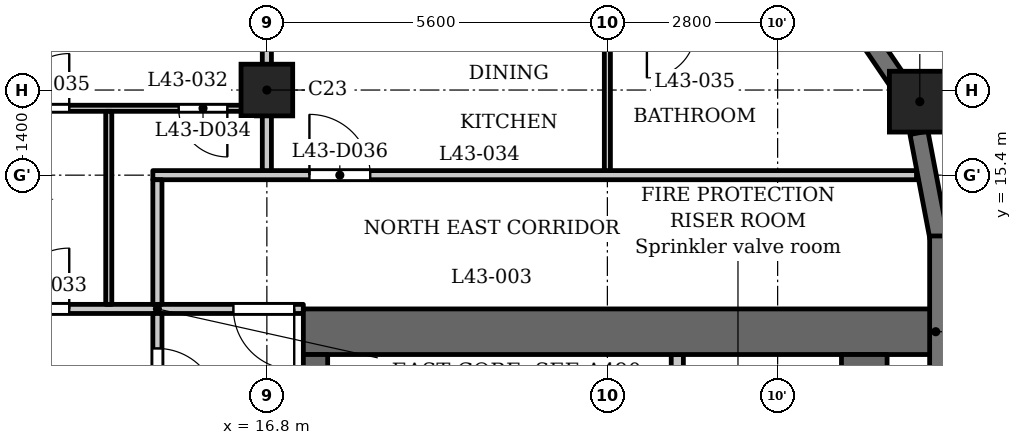
"""IFC4 building model, lengths in metres.
Left out: names, types, materials, properties, quantities, classifications, styles, units other than length and angle.
Written with IfcOpenShell. Run it as: python <this file> out.ifc"""

import sys

from ifc_helpers import new_model, si_unit, direction, frame, frame_2d, origin, origin_2d, place, context, subcontext, project, spatial, rectangle, extrude, element, fill, save


model = new_model("IFC4")
c1 = context("Model", 3, precision=1e-05, world=origin(), true_north=direction((0.0, 1.0)))
c2 = subcontext(c1, "Body", "Model", "MODEL_VIEW")
j1 = project(units=[si_unit("LENGTHUNIT", "METRE"), si_unit("PLANEANGLEUNIT", "RADIAN")], contexts=[c1])
p1 = place(None, origin())
s1 = spatial("IfcSite", under=j1, at=p1, CompositionType="ELEMENT")
p2 = place(p1, origin())
s2 = spatial("IfcBuilding", under=s1, at=p2, CompositionType="ELEMENT")
p3 = place(p2, frame((0.0, 0.0, 167.6)))
s3 = spatial("IfcBuildingStorey", under=s2, at=p3, CompositionType="ELEMENT", Elevation=167.6)
p4 = place(p3, frame((27.538, 16.609, 0.0), z_axis=(0.0, 0.0, 1.0), x_axis=(1.0, 0.0, 0.0)))
e1 = element("IfcColumn", 1, at=p4, inside=s3, PredefinedType="COLUMN", context=c2, shape_type="SweptSolid", body=[
    extrude(rectangle(XDim=1.0, YDim=1.0, at=origin_2d()), origin(), (0.0, 0.0, 1.0), 3.5),
])
p5 = place(p3, frame((16.8, 16.8, 0.0), z_axis=(0.0, 0.0, 1.0), x_axis=(1.0, 0.0, 0.0)))
e2 = element("IfcColumn", 2, at=p5, inside=s3, PredefinedType="COLUMN", context=c2, shape_type="SweptSolid", body=[
    extrude(rectangle(XDim=0.85, YDim=0.85, at=origin_2d()), origin(), (0.0, 0.0, 1.0), 3.5),
])
p6 = place(p3, frame((27.85, 11.7, 0.0), z_axis=(0.0, 0.0, 1.0), x_axis=(0.0, 1.0, 0.0)))
e3 = element("IfcWall", 3, at=p6, inside=s3, PredefinedType="SOLIDWALL", context=c2, shape_type="SweptSolid", body=[
    extrude(rectangle(XDim=2.7, YDim=0.3, at=frame_2d((1.35, 0.0))), origin(), (0.0, 0.0, 1.0), 2.45),
])
for number, where, z_axis, x_axis in (
    (4, (27.853, 14.372, 0.0), (0.0, 0.0, 1.0), (-0.187, 0.982, 0.0)),
    (5, (27.166, 16.96, 0.0), (0.0, 0.0, 1.0), (-0.562, 0.827, 0.0)),
):
    element("IfcWall", number, at=place(p3, frame(where, z_axis=z_axis, x_axis=x_axis)), inside=s3, PredefinedType="SOLIDWALL", context=c2, shape_type="SweptSolid", body=[
        extrude(rectangle(XDim=1.756, YDim=0.3, at=frame_2d((0.878, 0.0))), origin(), (0.0, 0.0, 1.0), 2.45),
    ])
p7 = place(p3, frame((17.4, 12.825, 0.0), z_axis=(0.0, 0.0, 1.0), x_axis=(1.0, 0.0, 0.0)))
e6 = element("IfcWall", 6, at=p7, inside=s3, PredefinedType="SHEAR", context=c2, shape_type="SweptSolid", body=[
    extrude(rectangle(XDim=10.4, YDim=0.75, at=frame_2d((5.2, 0.0))), origin(), (0.0, 0.0, 1.0), 3.2),
])
p8 = place(p3, frame((17.6, -12.45, 0.0), z_axis=(0.0, 0.0, 1.0), x_axis=(0.0, 1.0, 0.0)))
e7 = element("IfcWall", 7, at=p8, inside=s3, PredefinedType="SHEAR", context=c2, shape_type="SweptSolid", body=[
    extrude(rectangle(XDim=24.9, YDim=0.4, at=frame_2d((12.45, 0.0))), origin(), (0.0, 0.0, 1.0), 3.2),
])
p9 = place(p8, frame((8.65, 0.0, 0.0)))
e8 = element("IfcOpeningElement", 8, at=p9, cuts=e7, PredefinedType="OPENING", context=c2, shape_type="SweptSolid", body=[
    extrude(rectangle(XDim=0.9, YDim=2.1, at=frame_2d((0.45, 1.05))), frame((0.0, 0.21, 0.0), z_axis=(0.0, -1.0, 0.0), x_axis=(1.0, 0.0, 0.0)), (0.0, 0.0, 1.0), 0.42),
])
p10 = place(p8, frame((15.6, 0.0, 0.0)))
e9 = element("IfcOpeningElement", 9, at=p10, cuts=e7, PredefinedType="OPENING", context=c2, shape_type="SweptSolid", body=[
    extrude(rectangle(XDim=1.1, YDim=2.1, at=frame_2d((0.55, 1.05))), frame((0.0, 0.21, 0.0), z_axis=(0.0, -1.0, 0.0), x_axis=(1.0, 0.0, 0.0)), (0.0, 0.0, 1.0), 0.42),
])
p11 = place(p8, frame((18.0, 0.0, 0.0)))
e10 = element("IfcOpeningElement", 10, at=p11, cuts=e7, PredefinedType="OPENING", context=c2, shape_type="SweptSolid", body=[
    extrude(rectangle(XDim=1.1, YDim=2.1, at=frame_2d((0.55, 1.05))), frame((0.0, 0.21, 0.0), z_axis=(0.0, -1.0, 0.0), x_axis=(1.0, 0.0, 0.0)), (0.0, 0.0, 1.0), 0.42),
])
p12 = place(p8, frame((23.025, 0.0, 0.0)))
e11 = element("IfcOpeningElement", 11, at=p12, cuts=e7, PredefinedType="OPENING", context=c2, shape_type="SweptSolid", body=[
    extrude(rectangle(XDim=1.1, YDim=2.1, at=frame_2d((0.55, 1.05))), frame((0.0, 0.21, 0.0), z_axis=(0.0, -1.0, 0.0), x_axis=(1.0, 0.0, 0.0)), (0.0, 0.0, 1.0), 0.42),
])
p13 = place(p8, frame((0.775, 0.0, 0.0)))
e12 = element("IfcOpeningElement", 12, at=p13, cuts=e7, PredefinedType="OPENING", context=c2, shape_type="SweptSolid", body=[
    extrude(rectangle(XDim=1.1, YDim=2.1, at=frame_2d((0.55, 1.05))), frame((0.0, 0.21, 0.0), z_axis=(0.0, -1.0, 0.0), x_axis=(1.0, 0.0, 0.0)), (0.0, 0.0, 1.0), 0.42),
])
p14 = place(p8, frame((12.925, 0.0, 0.0)))
e13 = element("IfcOpeningElement", 13, at=p14, cuts=e7, PredefinedType="OPENING", context=c2, shape_type="SweptSolid", body=[
    extrude(rectangle(XDim=1.8, YDim=2.1, at=frame_2d((0.9, 1.05))), frame((0.0, 0.21, 0.0), z_axis=(0.0, -1.0, 0.0), x_axis=(1.0, 0.0, 0.0)), (0.0, 0.0, 1.0), 0.42),
])
p15 = place(p3, frame((26.625, -12.45, 0.0), z_axis=(0.0, 0.0, 1.0), x_axis=(0.0, 1.0, 0.0)))
e14 = element("IfcWall", 14, at=p15, inside=s3, PredefinedType="SHEAR", context=c2, shape_type="SweptSolid", body=[
    extrude(rectangle(XDim=24.9, YDim=0.75, at=frame_2d((12.45, 0.0))), origin(), (0.0, 0.0, 1.0), 3.2),
])
p16 = place(p3, frame((23.55, 9.8, 0.0), z_axis=(0.0, 0.0, 1.0), x_axis=(0.0, 1.0, 0.0)))
e15 = element("IfcWall", 15, at=p16, inside=s3, PredefinedType="PARTITIONING", context=c2, shape_type="SweptSolid", body=[
    extrude(rectangle(XDim=2.65, YDim=0.2, at=frame_2d((1.325, 0.0))), origin(), (0.0, 0.0, 1.0), 3.2),
])
p17 = place(p16, frame((0.875, 0.0, 0.0)))
e16 = element("IfcOpeningElement", 16, at=p17, cuts=e15, PredefinedType="OPENING", context=c2, shape_type="SweptSolid", body=[
    extrude(rectangle(XDim=0.9, YDim=2.1, at=frame_2d((0.45, 1.05))), frame((0.0, 0.11, 0.0), z_axis=(0.0, -1.0, 0.0), x_axis=(1.0, 0.0, 0.0)), (0.0, 0.0, 1.0), 0.22),
])
p18 = place(p3, frame((-17.4, 13.2, 0.0), z_axis=(0.0, 0.0, 1.0), x_axis=(1.0, 0.0, 0.0)))
e17 = element("IfcWall", 17, at=p18, inside=s3, PredefinedType="PARTITIONING", context=c2, shape_type="SweptSolid", body=[
    extrude(rectangle(XDim=34.8, YDim=0.15, at=frame_2d((17.4, 0.0))), origin(), (0.0, 0.0, 1.0), 3.2),
])
p19 = place(p18, frame((0.25, 0.0, 0.0)))
e18 = element("IfcOpeningElement", 18, at=p19, cuts=e17, PredefinedType="OPENING", context=c2, shape_type="SweptSolid", body=[
    extrude(rectangle(XDim=1.0, YDim=2.1, at=frame_2d((0.5, 1.05))), frame((0.0, 0.085, 0.0), z_axis=(0.0, -1.0, 0.0), x_axis=(1.0, 0.0, 0.0)), (0.0, 0.0, 1.0), 0.17),
])
p20 = place(p18, frame((33.65, 0.0, 0.0)))
e19 = element("IfcOpeningElement", 19, at=p20, cuts=e17, PredefinedType="OPENING", context=c2, shape_type="SweptSolid", body=[
    extrude(rectangle(XDim=1.0, YDim=2.1, at=frame_2d((0.5, 1.05))), frame((0.0, 0.085, 0.0), z_axis=(0.0, -1.0, 0.0), x_axis=(1.0, 0.0, 0.0)), (0.0, 0.0, 1.0), 0.17),
])
p21 = place(p18, frame((10.15, 0.0, 0.0)))
e20 = element("IfcOpeningElement", 20, at=p21, cuts=e17, PredefinedType="OPENING", context=c2, shape_type="SweptSolid", body=[
    extrude(rectangle(XDim=1.0, YDim=2.1, at=frame_2d((0.5, 1.05))), frame((0.0, 0.085, 0.0), z_axis=(0.0, -1.0, 0.0), x_axis=(1.0, 0.0, 0.0)), (0.0, 0.0, 1.0), 0.17),
])
p22 = place(p18, frame((15.75, 0.0, 0.0)))
e21 = element("IfcOpeningElement", 21, at=p22, cuts=e17, PredefinedType="OPENING", context=c2, shape_type="SweptSolid", body=[
    extrude(rectangle(XDim=1.0, YDim=2.1, at=frame_2d((0.5, 1.05))), frame((0.0, 0.085, 0.0), z_axis=(0.0, -1.0, 0.0), x_axis=(1.0, 0.0, 0.0)), (0.0, 0.0, 1.0), 0.17),
])
p23 = place(p18, frame((24.95, 0.0, 0.0)))
e22 = element("IfcOpeningElement", 22, at=p23, cuts=e17, PredefinedType="OPENING", context=c2, shape_type="SweptSolid", body=[
    extrude(rectangle(XDim=1.0, YDim=2.1, at=frame_2d((0.5, 1.05))), frame((0.0, 0.085, 0.0), z_axis=(0.0, -1.0, 0.0), x_axis=(1.0, 0.0, 0.0)), (0.0, 0.0, 1.0), 0.17),
])
p24 = place(p18, frame((29.95, 0.0, 0.0)))
e23 = element("IfcOpeningElement", 23, at=p24, cuts=e17, PredefinedType="OPENING", context=c2, shape_type="SweptSolid", body=[
    extrude(rectangle(XDim=1.0, YDim=2.1, at=frame_2d((0.5, 1.05))), frame((0.0, 0.085, 0.0), z_axis=(0.0, -1.0, 0.0), x_axis=(1.0, 0.0, 0.0)), (0.0, 0.0, 1.0), 0.17),
])
p25 = place(p3, frame((14.925, 15.4, 0.0), z_axis=(0.0, 0.0, 1.0), x_axis=(1.0, 0.0, 0.0)))
e24 = element("IfcWall", 24, at=p25, inside=s3, PredefinedType="PARTITIONING", context=c2, shape_type="SweptSolid", body=[
    extrude(rectangle(XDim=12.559, YDim=0.15, at=frame_2d((6.279, 0.0))), origin(), (0.0, 0.0, 1.0), 3.2),
])
p26 = place(p25, frame((2.575, 0.0, 0.0)))
e25 = element("IfcOpeningElement", 25, at=p26, cuts=e24, PredefinedType="OPENING", context=c2, shape_type="SweptSolid", body=[
    extrude(rectangle(XDim=1.0, YDim=2.1, at=frame_2d((0.5, 1.05))), frame((0.0, 0.085, 0.0), z_axis=(0.0, -1.0, 0.0), x_axis=(1.0, 0.0, 0.0)), (0.0, 0.0, 1.0), 0.17),
])
p27 = place(p3, frame((-16.725, 16.5, 0.0), z_axis=(0.0, 0.0, 1.0), x_axis=(1.0, 0.0, 0.0)))
e26 = element("IfcWall", 26, at=p27, inside=s3, PredefinedType="PARTITIONING", context=c2, shape_type="SweptSolid", body=[
    extrude(rectangle(XDim=33.45, YDim=0.1, at=frame_2d((16.725, 0.0))), origin(), (0.0, 0.0, 1.0), 3.2),
])
p28 = place(p27, frame((0.575, 0.0, 0.0)))
e27 = element("IfcOpeningElement", 27, at=p28, cuts=e26, PredefinedType="OPENING", context=c2, shape_type="SweptSolid", body=[
    extrude(rectangle(XDim=0.8, YDim=2.1, at=frame_2d((0.4, 1.05))), frame((0.0, 0.06, 0.0), z_axis=(0.0, -1.0, 0.0), x_axis=(1.0, 0.0, 0.0)), (0.0, 0.0, 1.0), 0.12),
])
p29 = place(p27, frame((3.225, 0.0, 0.0)))
e28 = element("IfcOpeningElement", 28, at=p29, cuts=e26, PredefinedType="OPENING", context=c2, shape_type="SweptSolid", body=[
    extrude(rectangle(XDim=0.9, YDim=2.1, at=frame_2d((0.45, 1.05))), frame((0.0, 0.06, 0.0), z_axis=(0.0, -1.0, 0.0), x_axis=(1.0, 0.0, 0.0)), (0.0, 0.0, 1.0), 0.12),
])
p30 = place(p27, frame((6.775, 0.0, 0.0)))
e29 = element("IfcOpeningElement", 29, at=p30, cuts=e26, PredefinedType="OPENING", context=c2, shape_type="SweptSolid", body=[
    extrude(rectangle(XDim=0.9, YDim=2.1, at=frame_2d((0.45, 1.05))), frame((0.0, 0.06, 0.0), z_axis=(0.0, -1.0, 0.0), x_axis=(1.0, 0.0, 0.0)), (0.0, 0.0, 1.0), 0.12),
])
p31 = place(p27, frame((8.825, 0.0, 0.0)))
e30 = element("IfcOpeningElement", 30, at=p31, cuts=e26, PredefinedType="OPENING", context=c2, shape_type="SweptSolid", body=[
    extrude(rectangle(XDim=0.9, YDim=2.1, at=frame_2d((0.45, 1.05))), frame((0.0, 0.06, 0.0), z_axis=(0.0, -1.0, 0.0), x_axis=(1.0, 0.0, 0.0)), (0.0, 0.0, 1.0), 0.12),
])
p32 = place(p27, frame((20.775, 0.0, 0.0)))
e31 = element("IfcOpeningElement", 31, at=p32, cuts=e26, PredefinedType="OPENING", context=c2, shape_type="SweptSolid", body=[
    extrude(rectangle(XDim=0.8, YDim=2.1, at=frame_2d((0.4, 1.05))), frame((0.0, 0.06, 0.0), z_axis=(0.0, -1.0, 0.0), x_axis=(1.0, 0.0, 0.0)), (0.0, 0.0, 1.0), 0.12),
])
p33 = place(p27, frame((17.325, 0.0, 0.0)))
e32 = element("IfcOpeningElement", 32, at=p33, cuts=e26, PredefinedType="OPENING", context=c2, shape_type="SweptSolid", body=[
    extrude(rectangle(XDim=0.9, YDim=2.1, at=frame_2d((0.45, 1.05))), frame((0.0, 0.06, 0.0), z_axis=(0.0, -1.0, 0.0), x_axis=(1.0, 0.0, 0.0)), (0.0, 0.0, 1.0), 0.12),
])
p34 = place(p27, frame((12.375, 0.0, 0.0)))
e33 = element("IfcOpeningElement", 33, at=p34, cuts=e26, PredefinedType="OPENING", context=c2, shape_type="SweptSolid", body=[
    extrude(rectangle(XDim=0.9, YDim=2.1, at=frame_2d((0.45, 1.05))), frame((0.0, 0.06, 0.0), z_axis=(0.0, -1.0, 0.0), x_axis=(1.0, 0.0, 0.0)), (0.0, 0.0, 1.0), 0.12),
])
p35 = place(p27, frame((14.425, 0.0, 0.0)))
e34 = element("IfcOpeningElement", 34, at=p35, cuts=e26, PredefinedType="OPENING", context=c2, shape_type="SweptSolid", body=[
    extrude(rectangle(XDim=0.9, YDim=2.1, at=frame_2d((0.45, 1.05))), frame((0.0, 0.06, 0.0), z_axis=(0.0, -1.0, 0.0), x_axis=(1.0, 0.0, 0.0)), (0.0, 0.0, 1.0), 0.12),
])
p36 = place(p27, frame((26.575, 0.0, 0.0)))
e35 = element("IfcOpeningElement", 35, at=p36, cuts=e26, PredefinedType="OPENING", context=c2, shape_type="SweptSolid", body=[
    extrude(rectangle(XDim=0.8, YDim=2.1, at=frame_2d((0.4, 1.05))), frame((0.0, 0.06, 0.0), z_axis=(0.0, -1.0, 0.0), x_axis=(1.0, 0.0, 0.0)), (0.0, 0.0, 1.0), 0.12),
])
p37 = place(p27, frame((23.775, 0.0, 0.0)))
e36 = element("IfcOpeningElement", 36, at=p37, cuts=e26, PredefinedType="OPENING", context=c2, shape_type="SweptSolid", body=[
    extrude(rectangle(XDim=0.9, YDim=2.1, at=frame_2d((0.45, 1.05))), frame((0.0, 0.06, 0.0), z_axis=(0.0, -1.0, 0.0), x_axis=(1.0, 0.0, 0.0)), (0.0, 0.0, 1.0), 0.12),
])
p38 = place(p27, frame((32.075, 0.0, 0.0)))
e37 = element("IfcOpeningElement", 37, at=p38, cuts=e26, PredefinedType="OPENING", context=c2, shape_type="SweptSolid", body=[
    extrude(rectangle(XDim=0.8, YDim=2.1, at=frame_2d((0.4, 1.05))), frame((0.0, 0.06, 0.0), z_axis=(0.0, -1.0, 0.0), x_axis=(1.0, 0.0, 0.0)), (0.0, 0.0, 1.0), 0.12),
])
p39 = place(p27, frame((29.375, 0.0, 0.0)))
e38 = element("IfcOpeningElement", 38, at=p39, cuts=e26, PredefinedType="OPENING", context=c2, shape_type="SweptSolid", body=[
    extrude(rectangle(XDim=0.9, YDim=2.1, at=frame_2d((0.45, 1.05))), frame((0.0, 0.06, 0.0), z_axis=(0.0, -1.0, 0.0), x_axis=(1.0, 0.0, 0.0)), (0.0, 0.0, 1.0), 0.12),
])
p40 = place(p3, frame((14.2, 13.275, 0.0), z_axis=(0.0, 0.0, 1.0), x_axis=(0.0, 1.0, 0.0)))
e39 = element("IfcWall", 39, at=p40, inside=s3, PredefinedType="PARTITIONING", context=c2, shape_type="SweptSolid", body=[
    extrude(rectangle(XDim=3.175, YDim=0.1, at=frame_2d((1.587, 0.0))), origin(), (0.0, 0.0, 1.0), 3.2),
])
p41 = place(p3, frame((15.0, 6.769, 0.0), z_axis=(0.0, 0.0, 1.0), x_axis=(0.0, 1.0, 0.0)))
e40 = element("IfcWall", 40, at=p41, inside=s3, PredefinedType="PARTITIONING", context=c2, shape_type="SweptSolid", body=[
    extrude(rectangle(XDim=6.356, YDim=0.15, at=frame_2d((3.178, 0.0))), origin(), (0.0, 0.0, 1.0), 3.2),
])
p42 = place(p41, frame((4.781, 0.0, 0.0)))
e41 = element("IfcOpeningElement", 41, at=p42, cuts=e40, PredefinedType="OPENING", context=c2, shape_type="SweptSolid", body=[
    extrude(rectangle(XDim=1.0, YDim=2.1, at=frame_2d((0.5, 1.05))), frame((0.0, 0.085, 0.0), z_axis=(0.0, -1.0, 0.0), x_axis=(1.0, 0.0, 0.0)), (0.0, 0.0, 1.0), 0.17),
])
p43 = place(p3, frame((15.0, 13.275, 0.0), z_axis=(0.0, 0.0, 1.0), x_axis=(0.0, 1.0, 0.0)))
e42 = element("IfcWall", 42, at=p43, inside=s3, PredefinedType="PARTITIONING", context=c2, shape_type="SweptSolid", body=[
    extrude(rectangle(XDim=2.05, YDim=0.15, at=frame_2d((1.025, 0.0))), origin(), (0.0, 0.0, 1.0), 3.2),
])
p44 = place(p3, frame((16.8, 15.475, 0.0), z_axis=(0.0, 0.0, 1.0), x_axis=(0.0, 1.0, 0.0)))
e43 = element("IfcWall", 43, at=p44, inside=s3, PredefinedType="PARTITIONING", context=c2, shape_type="SweptSolid", body=[
    extrude(rectangle(XDim=7.405, YDim=0.15, at=frame_2d((3.702, 0.0))), origin(), (0.0, 0.0, 1.0), 3.2),
])
p45 = place(p3, frame((22.4, 15.475, 0.0), z_axis=(0.0, 0.0, 1.0), x_axis=(0.0, 1.0, 0.0)))
e44 = element("IfcWall", 44, at=p45, inside=s3, PredefinedType="PARTITIONING", context=c2, shape_type="SweptSolid", body=[
    extrude(rectangle(XDim=2.275, YDim=0.1, at=frame_2d((1.137, 0.0))), origin(), (0.0, 0.0, 1.0), 3.2),
])
p46 = place(p42, origin())
e45 = element("IfcDoor", 45, at=p46, inside=s3, OperationType="SINGLE_SWING_LEFT", PredefinedType="DOOR", context=c2, shape_type="SweptSolid", body=[
    extrude(rectangle(XDim=1.0, YDim=2.1, at=frame_2d((0.5, 1.05))), frame((0.0, 0.025, 0.0), z_axis=(0.0, -1.0, 0.0), x_axis=(1.0, 0.0, 0.0)), (0.0, 0.0, 1.0), 0.05),
])
fill(e41, e45)
p47 = place(p20, origin())
e46 = element("IfcDoor", 46, at=p47, inside=s3, OperationType="SINGLE_SWING_RIGHT", PredefinedType="DOOR", context=c2, shape_type="SweptSolid", body=[
    extrude(rectangle(XDim=1.0, YDim=2.1, at=frame_2d((0.5, 1.05))), frame((0.0, 0.025, 0.0), z_axis=(0.0, -1.0, 0.0), x_axis=(1.0, 0.0, 0.0)), (0.0, 0.0, 1.0), 0.05),
])
fill(e19, e46)
p48 = place(p24, origin())
e47 = element("IfcDoor", 47, at=p48, inside=s3, OperationType="SINGLE_SWING_LEFT", PredefinedType="DOOR", context=c2, shape_type="SweptSolid", body=[
    extrude(rectangle(XDim=1.0, YDim=2.1, at=frame_2d((0.5, 1.05))), frame((0.0, 0.025, 0.0), z_axis=(0.0, -1.0, 0.0), x_axis=(1.0, 0.0, 0.0)), (0.0, 0.0, 1.0), 0.05),
])
fill(e23, e47)
p49 = place(p38, origin())
e48 = element("IfcDoor", 48, at=p49, inside=s3, OperationType="SINGLE_SWING_RIGHT", PredefinedType="DOOR", context=c2, shape_type="SweptSolid", body=[
    extrude(rectangle(XDim=0.8, YDim=2.1, at=frame_2d((0.4, 1.05))), frame((0.0, 0.025, 0.0), z_axis=(0.0, -1.0, 0.0), x_axis=(1.0, 0.0, 0.0)), (0.0, 0.0, 1.0), 0.05),
])
fill(e37, e48)
p50 = place(p39, origin())
e49 = element("IfcDoor", 49, at=p50, inside=s3, OperationType="SINGLE_SWING_LEFT", PredefinedType="DOOR", context=c2, shape_type="SweptSolid", body=[
    extrude(rectangle(XDim=0.9, YDim=2.1, at=frame_2d((0.45, 1.05))), frame((0.0, 0.025, 0.0), z_axis=(0.0, -1.0, 0.0), x_axis=(1.0, 0.0, 0.0)), (0.0, 0.0, 1.0), 0.05),
])
fill(e38, e49)
p51 = place(p26, origin())
e50 = element("IfcDoor", 50, at=p51, inside=s3, OperationType="SINGLE_SWING_RIGHT", PredefinedType="DOOR", context=c2, shape_type="SweptSolid", body=[
    extrude(rectangle(XDim=1.0, YDim=2.1, at=frame_2d((0.5, 1.05))), frame((0.0, 0.025, 0.0), z_axis=(0.0, -1.0, 0.0), x_axis=(1.0, 0.0, 0.0)), (0.0, 0.0, 1.0), 0.05),
])
fill(e25, e50)
save(model, sys.argv[1])
